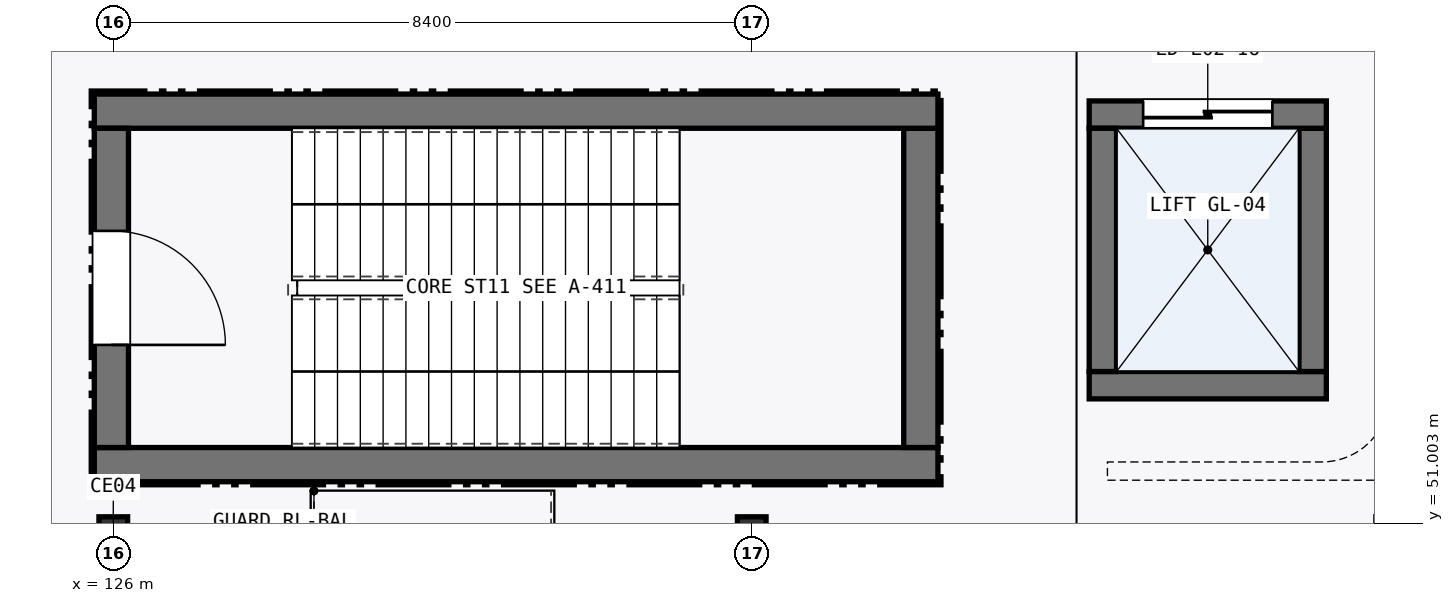
"""IFC4 building model, lengths in metres.
Left out: names, types, materials, properties, quantities, classifications, styles, units other than length and angle.
Written with IfcOpenShell. Run it as: python <this file> out.ifc"""

import sys

from ifc_helpers import new_model, si_unit, direction, frame, frame_2d, origin, origin_2d, place, context, subcontext, project, spatial, rectangle, hollow_circle, extrude, element, fill, save


model = new_model("IFC4")
c1 = context("Model", 3, precision=1e-05, world=origin(), true_north=direction((0.0, 1.0)))
c2 = subcontext(c1, "Body", "Model", "MODEL_VIEW")
j1 = project(units=[si_unit("LENGTHUNIT", "METRE"), si_unit("PLANEANGLEUNIT", "RADIAN")], contexts=[c1])
p1 = place(None, origin())
s1 = spatial("IfcSite", under=j1, at=p1, CompositionType="ELEMENT")
p2 = place(p1, origin())
s2 = spatial("IfcBuilding", under=s1, at=p2, CompositionType="ELEMENT")
p3 = place(p2, frame((0.0, 0.0, 6.0)))
s3 = spatial("IfcBuildingStorey", under=s2, at=p3, CompositionType="ELEMENT", Elevation=6.0)
for number, where, z_axis, x_axis in (
    (1, (126.0, 50.9, 0.0), (0.0, 0.0, 1.0), (1.0, 0.0, 0.0)),
    (2, (134.4, 50.9, 0.0), (0.0, 0.0, 1.0), (1.0, 0.0, 0.0)),
):
    element("IfcColumn", number, at=place(p3, frame(where, z_axis=z_axis, x_axis=x_axis)), inside=s3, PredefinedType="COLUMN", context=c2, shape_type="SweptSolid", body=[
        extrude(hollow_circle(Radius=0.188, WallThickness=0.014, at=origin_2d()), origin(), (0.0, 0.0, 1.0), 5.4),
    ])
p4 = place(p3, frame((125.75, 51.775, 0.0), z_axis=(0.0, 0.0, 1.0), x_axis=(1.0, 0.0, 0.0)))
e3 = element("IfcWall", 3, at=p4, inside=s3, PredefinedType="SHEAR", context=c2, shape_type="SweptSolid", body=[
    extrude(rectangle(XDim=11.1, YDim=0.45, at=frame_2d((5.55, 0.0))), origin(), (0.0, 0.0, 1.0), 5.145),
])
p5 = place(p3, frame((136.625, 52.0, 0.0), z_axis=(0.0, 0.0, 1.0), x_axis=(0.0, 1.0, 0.0)))
e4 = element("IfcWall", 4, at=p5, inside=s3, PredefinedType="SHEAR", context=c2, shape_type="SweptSolid", body=[
    extrude(rectangle(XDim=4.2, YDim=0.45, at=frame_2d((2.1, 0.0))), origin(), (0.0, 0.0, 1.0), 5.145),
])
p6 = place(p3, frame((136.85, 56.425, 0.0), z_axis=(0.0, 0.0, 1.0), x_axis=(-1.0, 0.0, 0.0)))
e5 = element("IfcWall", 5, at=p6, inside=s3, PredefinedType="SHEAR", context=c2, shape_type="SweptSolid", body=[
    extrude(rectangle(XDim=11.1, YDim=0.45, at=frame_2d((5.55, 0.0))), origin(), (0.0, 0.0, 1.0), 5.145),
])
p7 = place(p3, frame((125.975, 56.2, 0.0), z_axis=(0.0, 0.0, 1.0), x_axis=(0.0, -1.0, 0.0)))
e6 = element("IfcWall", 6, at=p7, inside=s3, PredefinedType="SHEAR", context=c2, shape_type="SweptSolid", body=[
    extrude(rectangle(XDim=4.2, YDim=0.45, at=frame_2d((2.1, 0.0))), origin(), (0.0, 0.0, 1.0), 5.145),
])
p8 = place(p7, frame((1.35, 0.0, 0.0)))
e7 = element("IfcOpeningElement", 7, at=p8, cuts=e6, PredefinedType="OPENING", context=c2, shape_type="SweptSolid", body=[
    extrude(rectangle(XDim=1.5, YDim=2.15, at=frame_2d((0.75, 1.075))), frame((0.0, 0.235, 0.0), z_axis=(0.0, -1.0, 0.0), x_axis=(1.0, 0.0, 0.0)), (0.0, 0.0, 1.0), 0.47),
])
p9 = place(p3, frame((138.84, 52.82, 0.0), z_axis=(0.0, 0.0, 1.0), x_axis=(1.0, 0.0, 0.0)))
e8 = element("IfcWall", 8, at=p9, inside=s3, PredefinedType="SHEAR", context=c2, shape_type="SweptSolid", body=[
    extrude(rectangle(XDim=3.12, YDim=0.36, at=frame_2d((1.56, 0.0))), origin(), (0.0, 0.0, 1.0), 5.145),
])
p10 = place(p3, frame((141.78, 53.0, 0.0), z_axis=(0.0, 0.0, 1.0), x_axis=(0.0, 1.0, 0.0)))
e9 = element("IfcWall", 9, at=p10, inside=s3, PredefinedType="SHEAR", context=c2, shape_type="SweptSolid", body=[
    extrude(rectangle(XDim=3.2, YDim=0.36, at=frame_2d((1.6, 0.0))), origin(), (0.0, 0.0, 1.0), 5.145),
])
p11 = place(p3, frame((141.96, 56.38, 0.0), z_axis=(0.0, 0.0, 1.0), x_axis=(-1.0, 0.0, 0.0)))
e10 = element("IfcWall", 10, at=p11, inside=s3, PredefinedType="SHEAR", context=c2, shape_type="SweptSolid", body=[
    extrude(rectangle(XDim=3.12, YDim=0.36, at=frame_2d((1.56, 0.0))), origin(), (0.0, 0.0, 1.0), 5.145),
])
p12 = place(p11, frame((0.71, 0.0, 0.0)))
e11 = element("IfcOpeningElement", 11, at=p12, cuts=e10, PredefinedType="OPENING", context=c2, shape_type="SweptSolid", body=[
    extrude(rectangle(XDim=1.7, YDim=2.3, at=frame_2d((0.85, 1.15))), frame((0.0, 0.19, 0.0), z_axis=(0.0, -1.0, 0.0), x_axis=(1.0, 0.0, 0.0)), (0.0, 0.0, 1.0), 0.38),
])
p13 = place(p3, frame((139.02, 56.2, 0.0), z_axis=(0.0, 0.0, 1.0), x_axis=(0.0, -1.0, 0.0)))
e12 = element("IfcWall", 12, at=p13, inside=s3, PredefinedType="SHEAR", context=c2, shape_type="SweptSolid", body=[
    extrude(rectangle(XDim=3.2, YDim=0.36, at=frame_2d((1.6, 0.0))), origin(), (0.0, 0.0, 1.0), 5.145),
])
p14 = place(p8, origin())
e13 = element("IfcDoor", 13, at=p14, inside=s3, OperationType="SINGLE_SWING_RIGHT", PredefinedType="DOOR", context=c2, shape_type="SweptSolid", body=[
    extrude(rectangle(XDim=1.5, YDim=2.15, at=frame_2d((0.75, 1.075))), frame((0.0, 0.025, 0.0), z_axis=(0.0, -1.0, 0.0), x_axis=(1.0, 0.0, 0.0)), (0.0, 0.0, 1.0), 0.05),
])
fill(e7, e13)
p15 = place(p12, frame((1.7, 0.0, 0.0), z_axis=(0.0, 0.0, 1.0), x_axis=(-1.0, 0.0, 0.0)))
e14 = element("IfcDoor", 14, at=p15, inside=s3, OperationType="DOUBLE_DOOR_SLIDING", PredefinedType="DOOR", context=c2, shape_type="SweptSolid", body=[
    extrude(rectangle(XDim=1.7, YDim=2.3, at=frame_2d((0.85, 1.15))), frame((0.0, 0.025, 0.0), z_axis=(0.0, -1.0, 0.0), x_axis=(1.0, 0.0, 0.0)), (0.0, 0.0, 1.0), 0.05),
])
fill(e11, e14)
save(model, sys.argv[1])
